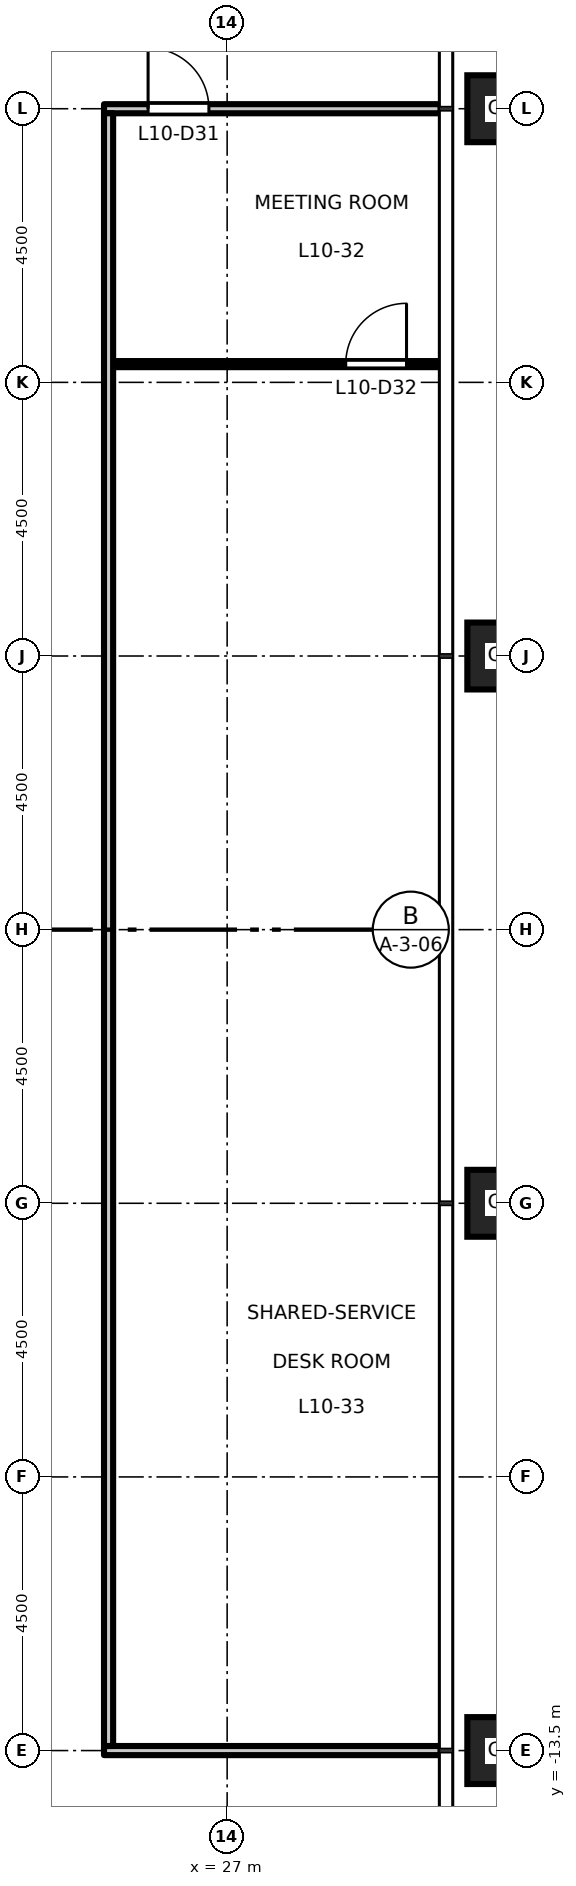
"""IFC4 building model, lengths in metres.
Left out: names, types, materials, properties, quantities, classifications, styles, units other than length and angle.
Written with IfcOpenShell. Run it as: python <this file> out.ifc"""

import sys

from ifc_helpers import new_model, si_unit, direction, frame, frame_2d, origin, origin_2d, place, context, subcontext, project, spatial, rectangle, hollow_rectangle, extrude, element, fill, save


model = new_model("IFC4")
c1 = context("Model", 3, precision=1e-05, world=origin(), true_north=direction((0.0, 1.0)))
c2 = subcontext(c1, "Body", "Model", "MODEL_VIEW")
j1 = project(units=[si_unit("LENGTHUNIT", "METRE"), si_unit("PLANEANGLEUNIT", "RADIAN")], contexts=[c1])
p1 = place(None, origin())
s1 = spatial("IfcSite", under=j1, at=p1, CompositionType="ELEMENT")
p2 = place(p1, origin())
s2 = spatial("IfcBuilding", under=s1, at=p2, CompositionType="ELEMENT")
p3 = place(p2, frame((0.0, 0.0, 49.2)))
s3 = spatial("IfcBuildingStorey", under=s2, at=p3, CompositionType="ELEMENT", Elevation=49.2)
for number, where, z_axis, x_axis in (
    (1, (31.5, -13.5, 0.0), (0.0, 0.0, 1.0), (1.0, 0.0, 0.0)),
    (2, (31.5, -4.5, 0.0), (0.0, 0.0, 1.0), (1.0, 0.0, 0.0)),
    (3, (31.5, 4.5, 0.0), (0.0, 0.0, 1.0), (1.0, 0.0, 0.0)),
    (4, (31.5, 13.5, 0.0), (0.0, 0.0, 1.0), (1.0, 0.0, 0.0)),
):
    element("IfcColumn", number, at=place(p3, frame(where, z_axis=z_axis, x_axis=x_axis)), inside=s3, PredefinedType="COLUMN", context=c2, shape_type="SweptSolid", body=[
        extrude(hollow_rectangle(XDim=1.1, YDim=1.1, WallThickness=0.07, at=origin_2d()), origin(), (0.0, 0.0, 1.0), 4.5),
    ])
p4 = place(p3, frame((24.975, -13.5, 0.0), z_axis=(0.0, 0.0, 1.0), x_axis=(1.0, 0.0, 0.0)))
e5 = element("IfcWall", 5, at=p4, inside=s3, PredefinedType="PARTITIONING", context=c2, shape_type="SweptSolid", body=[
    extrude(rectangle(XDim=5.535, YDim=0.15, at=frame_2d((2.768, 0.0))), origin(), (0.0, 0.0, 1.0), 3.35),
])
p5 = place(p3, frame((25.125, 9.3, 0.0), z_axis=(0.0, 0.0, 1.0), x_axis=(1.0, 0.0, 0.0)))
e6 = element("IfcWall", 6, at=p5, inside=s3, PredefinedType="PARTITIONING", context=c2, shape_type="SweptSolid", body=[
    extrude(rectangle(XDim=5.385, YDim=0.1, at=frame_2d((2.692, 0.0))), origin(), (0.0, 0.0, 1.0), 4.35),
])
p6 = place(p5, frame((3.825, 0.0, 0.0)))
e7 = element("IfcOpeningElement", 7, at=p6, cuts=e6, PredefinedType="OPENING", context=c2, shape_type="SweptSolid", body=[
    extrude(rectangle(XDim=1.0, YDim=2.1, at=frame_2d((0.5, 1.05))), frame((0.0, 0.06, 0.0), z_axis=(0.0, -1.0, 0.0), x_axis=(1.0, 0.0, 0.0)), (0.0, 0.0, 1.0), 0.12),
])
p7 = place(p3, frame((24.975, 13.5, 0.0), z_axis=(0.0, 0.0, 1.0), x_axis=(1.0, 0.0, 0.0)))
e8 = element("IfcWall", 8, at=p7, inside=s3, PredefinedType="PARTITIONING", context=c2, shape_type="SweptSolid", body=[
    extrude(rectangle(XDim=5.535, YDim=0.15, at=frame_2d((2.768, 0.0))), origin(), (0.0, 0.0, 1.0), 3.35),
])
p8 = place(p7, frame((0.725, 0.0, 0.0)))
e9 = element("IfcOpeningElement", 9, at=p8, cuts=e8, PredefinedType="OPENING", context=c2, shape_type="SweptSolid", body=[
    extrude(rectangle(XDim=1.0, YDim=2.1, at=frame_2d((0.5, 1.05))), frame((0.0, 0.085, 0.0), z_axis=(0.0, -1.0, 0.0), x_axis=(1.0, 0.0, 0.0)), (0.0, 0.0, 1.0), 0.17),
])
p9 = place(p3, frame((25.05, -13.425, 0.0), z_axis=(0.0, 0.0, 1.0), x_axis=(0.0, 1.0, 0.0)))
e10 = element("IfcWall", 10, at=p9, inside=s3, PredefinedType="PARTITIONING", context=c2, shape_type="SweptSolid", body=[
    extrude(rectangle(XDim=26.85, YDim=0.15, at=frame_2d((13.425, 0.0))), origin(), (0.0, 0.0, 1.0), 4.35),
])
p10 = place(p8, origin())
e11 = element("IfcDoor", 11, at=p10, inside=s3, OperationType="SINGLE_SWING_LEFT", PredefinedType="DOOR", context=c2, shape_type="SweptSolid", body=[
    extrude(rectangle(XDim=1.0, YDim=2.1, at=frame_2d((0.5, 1.05))), frame((0.0, 0.025, 0.0), z_axis=(0.0, -1.0, 0.0), x_axis=(1.0, 0.0, 0.0)), (0.0, 0.0, 1.0), 0.05),
])
fill(e9, e11)
p11 = place(p6, origin())
e12 = element("IfcDoor", 12, at=p11, inside=s3, OperationType="SINGLE_SWING_RIGHT", PredefinedType="DOOR", context=c2, shape_type="SweptSolid", body=[
    extrude(rectangle(XDim=1.0, YDim=2.1, at=frame_2d((0.5, 1.05))), frame((0.0, 0.025, 0.0), z_axis=(0.0, -1.0, 0.0), x_axis=(1.0, 0.0, 0.0)), (0.0, 0.0, 1.0), 0.05),
])
fill(e7, e12)
save(model, sys.argv[1])
